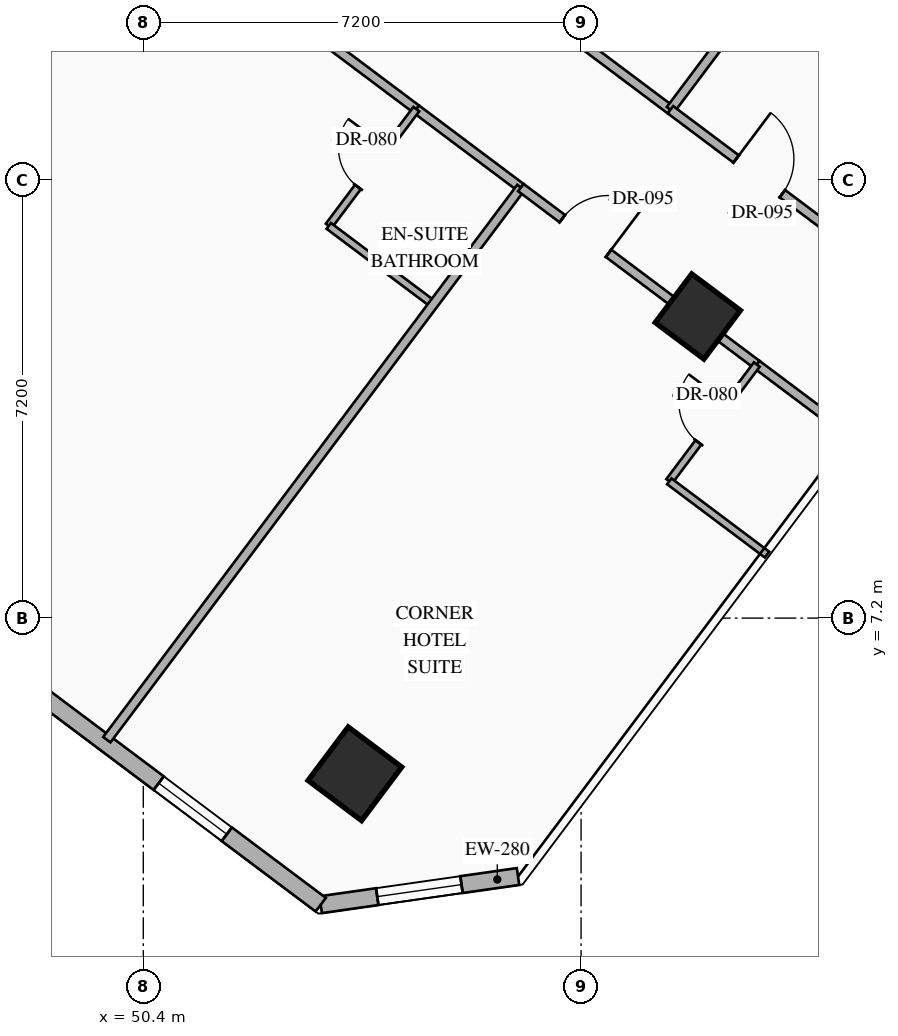
"""IFC4 building model, lengths in metres.
Left out: names, types, materials, properties, quantities, classifications, styles, units other than length and angle.
Written with IfcOpenShell. Run it as: python <this file> out.ifc"""

import sys

from ifc_helpers import new_model, si_unit, direction, frame, frame_2d, origin, origin_2d, place, context, subcontext, project, spatial, rectangle, hollow_rectangle, extrude, element, fill, save


model = new_model("IFC4")
c1 = context("Model", 3, precision=1e-05, world=origin(), true_north=direction((0.0, 1.0)))
c2 = subcontext(c1, "Body", "Model", "MODEL_VIEW")
j1 = project(units=[si_unit("LENGTHUNIT", "METRE"), si_unit("PLANEANGLEUNIT", "RADIAN")], contexts=[c1])
p1 = place(None, origin())
s1 = spatial("IfcSite", under=j1, at=p1, CompositionType="ELEMENT")
p2 = place(p1, origin())
s2 = spatial("IfcBuilding", under=s1, at=p2, CompositionType="ELEMENT")
p3 = place(p2, frame((0.0, 0.0, 46.65)))
s3 = spatial("IfcBuildingStorey", under=s2, at=p3, CompositionType="ELEMENT", Elevation=46.65)
p4 = place(p3, frame((53.88, 4.64, 0.0), z_axis=(0.0, 0.0, 1.0), x_axis=(0.799999996291, -0.600000004945, 0.0)))
e1 = element("IfcColumn", 1, at=p4, inside=s3, PredefinedType="COLUMN", context=c2, shape_type="SweptSolid", body=[
    extrude(hollow_rectangle(XDim=1.1, YDim=1.1, WallThickness=0.04, at=origin_2d()), origin(), (0.0, 0.0, 1.0), 3.35),
])
p5 = place(p3, frame((59.52, 12.16, 0.0), z_axis=(0.0, 0.0, 1.0), x_axis=(0.799999996291, -0.600000004945, 0.0)))
e2 = element("IfcColumn", 2, at=p5, inside=s3, PredefinedType="COLUMN", context=c2, shape_type="SweptSolid", body=[
    extrude(hollow_rectangle(XDim=1.0, YDim=1.0, WallThickness=0.038, at=origin_2d()), origin(), (0.0, 0.0, 1.0), 3.35),
])
p6 = place(p3, frame((56.563, 2.95, 0.0), z_axis=(0.0, 0.0, 1.0), x_axis=(-0.989977778067, -0.141223223777, 0.0)))
e3 = element("IfcWall", 3, at=p6, inside=s3, PredefinedType="STANDARD", context=c2, shape_type="SweptSolid", body=[
    extrude(rectangle(XDim=3.278, YDim=0.28, at=frame_2d((1.639, 0.0))), origin(), (0.0, 0.0, 1.0), 3.13),
])
p7 = place(p6, frame((0.939, 0.0, 0.85)))
e4 = element("IfcOpeningElement", 4, at=p7, cuts=e3, PredefinedType="OPENING", context=c2, shape_type="SweptSolid", body=[
    extrude(rectangle(XDim=1.4, YDim=1.8, at=frame_2d((0.7, 0.9))), frame((0.0, 0.15, 0.0), z_axis=(0.0, -1.0, 0.0), x_axis=(1.0, 0.0, 0.0)), (0.0, 0.0, 1.0), 0.3),
])
p8 = place(p3, frame((53.318, 2.487, 0.0), z_axis=(0.0, 0.0, 1.0), x_axis=(-0.800004174678, 0.599994433723, 0.0)))
e5 = element("IfcWall", 5, at=p8, inside=s3, PredefinedType="STANDARD", context=c2, shape_type="SweptSolid", body=[
    extrude(rectangle(XDim=35.089, YDim=0.28, at=frame_2d((17.544, 0.0))), origin(), (0.0, 0.0, 1.0), 3.13),
])
p9 = place(p8, frame((1.931, 0.0, 0.85)))
e6 = element("IfcOpeningElement", 6, at=p9, cuts=e5, PredefinedType="OPENING", context=c2, shape_type="SweptSolid", body=[
    extrude(rectangle(XDim=1.4, YDim=1.8, at=frame_2d((0.7, 0.9))), frame((0.0, 0.15, 0.0), z_axis=(0.0, -1.0, 0.0), x_axis=(1.0, 0.0, 0.0)), (0.0, 0.0, 1.0), 0.3),
])
p10 = place(p8, frame((6.819, 0.0, 0.85)))
e7 = element("IfcOpeningElement", 7, at=p10, cuts=e5, PredefinedType="OPENING", context=c2, shape_type="SweptSolid", body=[
    extrude(rectangle(XDim=1.4, YDim=1.8, at=frame_2d((0.7, 0.9))), frame((0.0, 0.15, 0.0), z_axis=(0.0, -1.0, 0.0), x_axis=(1.0, 0.0, 0.0)), (0.0, 0.0, 1.0), 0.3),
])
p11 = place(p8, frame((11.832, 0.0, 0.85)))
e8 = element("IfcOpeningElement", 8, at=p11, cuts=e5, PredefinedType="OPENING", context=c2, shape_type="SweptSolid", body=[
    extrude(rectangle(XDim=1.4, YDim=1.8, at=frame_2d((0.7, 0.9))), frame((0.0, 0.15, 0.0), z_axis=(0.0, -1.0, 0.0), x_axis=(1.0, 0.0, 0.0)), (0.0, 0.0, 1.0), 0.3),
])
p12 = place(p8, frame((17.647, 0.0, 0.85)))
e9 = element("IfcOpeningElement", 9, at=p12, cuts=e5, PredefinedType="OPENING", context=c2, shape_type="SweptSolid", body=[
    extrude(rectangle(XDim=1.4, YDim=1.8, at=frame_2d((0.7, 0.9))), frame((0.0, 0.15, 0.0), z_axis=(0.0, -1.0, 0.0), x_axis=(1.0, 0.0, 0.0)), (0.0, 0.0, 1.0), 0.3),
])
p13 = place(p8, frame((21.857, 0.0, 0.85)))
e10 = element("IfcOpeningElement", 10, at=p13, cuts=e5, PredefinedType="OPENING", context=c2, shape_type="SweptSolid", body=[
    extrude(rectangle(XDim=1.4, YDim=1.8, at=frame_2d((0.7, 0.9))), frame((0.0, 0.15, 0.0), z_axis=(0.0, -1.0, 0.0), x_axis=(1.0, 0.0, 0.0)), (0.0, 0.0, 1.0), 0.3),
])
p14 = place(p8, frame((26.87, 0.0, 0.85)))
e11 = element("IfcOpeningElement", 11, at=p14, cuts=e5, PredefinedType="OPENING", context=c2, shape_type="SweptSolid", body=[
    extrude(rectangle(XDim=1.4, YDim=1.8, at=frame_2d((0.7, 0.9))), frame((0.0, 0.15, 0.0), z_axis=(0.0, -1.0, 0.0), x_axis=(1.0, 0.0, 0.0)), (0.0, 0.0, 1.0), 0.3),
])
p15 = place(p8, frame((31.757, 0.0, 0.85)))
e12 = element("IfcOpeningElement", 12, at=p15, cuts=e5, PredefinedType="OPENING", context=c2, shape_type="SweptSolid", body=[
    extrude(rectangle(XDim=1.4, YDim=1.8, at=frame_2d((0.7, 0.9))), frame((0.0, 0.15, 0.0), z_axis=(0.0, -1.0, 0.0), x_axis=(1.0, 0.0, 0.0)), (0.0, 0.0, 1.0), 0.3),
])
p16 = place(p3, frame((57.35, 16.85, 0.0), z_axis=(0.0, 0.0, 1.0), x_axis=(0.79998637334, -0.60001816845, 0.0)))
e13 = element("IfcWall", 13, at=p16, inside=s3, PredefinedType="PARTITIONING", context=c2, shape_type="SweptSolid", body=[
    extrude(rectangle(XDim=2.15, YDim=0.15, at=frame_2d((1.075, 0.0))), origin(), (0.0, 0.0, 1.0), 2.775),
])
p17 = place(p3, frame((59.07, 15.56, 0.0), z_axis=(0.0, 0.0, 1.0), x_axis=(0.599996617946, 0.80000253653, 0.0)))
e14 = element("IfcWall", 14, at=p17, inside=s3, PredefinedType="PARTITIONING", context=c2, shape_type="SweptSolid", body=[
    extrude(rectangle(XDim=11.55, YDim=0.15, at=frame_2d((5.775, 0.0))), origin(), (0.0, 0.0, 1.0), 3.13),
])
p18 = place(p3, frame((59.07, 15.56, 0.0), z_axis=(0.0, 0.0, 1.0), x_axis=(0.8, -0.6, 0.0)))
e15 = element("IfcWall", 15, at=p18, inside=s3, PredefinedType="PARTITIONING", context=c2, shape_type="SweptSolid", body=[
    extrude(rectangle(XDim=3.65, YDim=0.15, at=frame_2d((1.825, 0.0))), origin(), (0.0, 0.0, 1.0), 2.775),
])
p19 = place(p18, frame((1.35, 0.0, 0.0)))
e16 = element("IfcOpeningElement", 16, at=p19, cuts=e15, PredefinedType="OPENING", context=c2, shape_type="SweptSolid", body=[
    extrude(rectangle(XDim=0.95, YDim=2.15, at=frame_2d((0.475, 1.075))), frame((0.0, 0.085, 0.0), z_axis=(0.0, -1.0, 0.0), x_axis=(1.0, 0.0, 0.0)), (0.0, 0.0, 1.0), 0.17),
])
p20 = place(p3, frame((46.37, 21.96, 0.0), z_axis=(0.0, 0.0, 1.0), x_axis=(0.799997249048, -0.600003667918, 0.0)))
e17 = element("IfcWall", 17, at=p20, inside=s3, PredefinedType="PARTITIONING", context=c2, shape_type="SweptSolid", body=[
    extrude(rectangle(XDim=10.65, YDim=0.15, at=frame_2d((5.325, 0.0))), origin(), (0.0, 0.0, 1.0), 2.425),
])
p21 = place(p20, frame((3.062, 0.0, 0.0)))
e18 = element("IfcOpeningElement", 18, at=p21, cuts=e17, PredefinedType="OPENING", context=c2, shape_type="SweptSolid", body=[
    extrude(rectangle(XDim=0.95, YDim=2.15, at=frame_2d((0.475, 1.075))), frame((0.0, 0.085, 0.0), z_axis=(0.0, -1.0, 0.0), x_axis=(1.0, 0.0, 0.0)), (0.0, 0.0, 1.0), 0.17),
])
p22 = place(p3, frame((54.89, 15.57, 0.0), z_axis=(0.0, 0.0, 1.0), x_axis=(0.800027249606, -0.599963665473, 0.0)))
e19 = element("IfcWall", 19, at=p22, inside=s3, PredefinedType="PARTITIONING", context=c2, shape_type="SweptSolid", body=[
    extrude(rectangle(XDim=2.15, YDim=0.15, at=frame_2d((1.075, 0.0))), origin(), (0.0, 0.0, 1.0), 2.425),
])
p23 = place(p3, frame((53.45, 13.65, 0.0), z_axis=(0.0, 0.0, 1.0), x_axis=(0.599951172744, 0.800036618114, 0.0)))
e20 = element("IfcWall", 20, at=p23, inside=s3, PredefinedType="PARTITIONING", context=c2, shape_type="SweptSolid", body=[
    extrude(rectangle(XDim=2.4, YDim=0.12, at=frame_2d((1.2, 0.0))), origin(), (0.0, 0.0, 1.0), 3.13),
])
p24 = place(p23, frame((0.8, 0.0, 0.0)))
e21 = element("IfcOpeningElement", 21, at=p24, cuts=e20, PredefinedType="OPENING", context=c2, shape_type="SweptSolid", body=[
    extrude(rectangle(XDim=0.8, YDim=2.06, at=frame_2d((0.4, 1.03))), frame((0.0, 0.07, 0.0), z_axis=(0.0, -1.0, 0.0), x_axis=(1.0, 0.0, 0.0)), (0.0, 0.0, 1.0), 0.14),
])
p25 = place(p3, frame((53.45, 13.65, 0.0), z_axis=(0.0, 0.0, 1.0), x_axis=(0.800040880289, -0.59994548908, 0.0)))
e22 = element("IfcWall", 22, at=p25, inside=s3, PredefinedType="PARTITIONING", context=c2, shape_type="SweptSolid", body=[
    extrude(rectangle(XDim=2.15, YDim=0.12, at=frame_2d((1.075, 0.0))), origin(), (0.0, 0.0, 1.0), 3.13),
])
p26 = place(p3, frame((49.8, 5.2, 0.0), z_axis=(0.0, 0.0, 1.0), x_axis=(0.6, 0.8, 0.0)))
e23 = element("IfcWall", 23, at=p26, inside=s3, PredefinedType="PARTITIONING", context=c2, shape_type="SweptSolid", body=[
    extrude(rectangle(XDim=11.35, YDim=0.15, at=frame_2d((5.675, 0.0))), origin(), (0.0, 0.0, 1.0), 3.13),
])
p27 = place(p3, frame((56.61, 14.28, 0.0), z_axis=(0.0, 0.0, 1.0), x_axis=(0.8, -0.6, 0.0)))
e24 = element("IfcWall", 24, at=p27, inside=s3, PredefinedType="PARTITIONING", context=c2, shape_type="SweptSolid", body=[
    extrude(rectangle(XDim=4.85, YDim=0.15, at=frame_2d((2.425, 0.0))), origin(), (0.0, 0.0, 1.0), 2.425),
])
p28 = place(p27, frame((0.851, 0.0, 0.0)))
e25 = element("IfcOpeningElement", 25, at=p28, cuts=e24, PredefinedType="OPENING", context=c2, shape_type="SweptSolid", body=[
    extrude(rectangle(XDim=0.95, YDim=2.15, at=frame_2d((0.475, 1.075))), frame((0.0, 0.085, 0.0), z_axis=(0.0, -1.0, 0.0), x_axis=(1.0, 0.0, 0.0)), (0.0, 0.0, 1.0), 0.17),
])
p29 = place(p3, frame((60.49, 11.37, 0.0), z_axis=(0.0, 0.0, 1.0), x_axis=(0.79997084737, -0.600038868206, 0.0)))
e26 = element("IfcWall", 26, at=p29, inside=s3, PredefinedType="PARTITIONING", context=c2, shape_type="SweptSolid", body=[
    extrude(rectangle(XDim=2.01, YDim=0.15, at=frame_2d((1.005, 0.0))), origin(), (0.0, 0.0, 1.0), 3.13),
])
p30 = place(p3, frame((59.05, 9.45, 0.0), z_axis=(0.0, 0.0, 1.0), x_axis=(0.599951172744, 0.800036618114, 0.0)))
e27 = element("IfcWall", 27, at=p30, inside=s3, PredefinedType="PARTITIONING", context=c2, shape_type="SweptSolid", body=[
    extrude(rectangle(XDim=2.4, YDim=0.12, at=frame_2d((1.2, 0.0))), origin(), (0.0, 0.0, 1.0), 3.13),
])
p31 = place(p30, frame((0.8, 0.0, 0.0)))
e28 = element("IfcOpeningElement", 28, at=p31, cuts=e27, PredefinedType="OPENING", context=c2, shape_type="SweptSolid", body=[
    extrude(rectangle(XDim=0.8, YDim=2.06, at=frame_2d((0.4, 1.03))), frame((0.0, 0.07, 0.0), z_axis=(0.0, -1.0, 0.0), x_axis=(1.0, 0.0, 0.0)), (0.0, 0.0, 1.0), 0.14),
])
p32 = place(p3, frame((59.05, 9.45, 0.0), z_axis=(0.0, 0.0, 1.0), x_axis=(0.79997084737, -0.600038868206, 0.0)))
e29 = element("IfcWall", 29, at=p32, inside=s3, PredefinedType="PARTITIONING", context=c2, shape_type="SweptSolid", body=[
    extrude(rectangle(XDim=2.01, YDim=0.12, at=frame_2d((1.005, 0.0))), origin(), (0.0, 0.0, 1.0), 3.13),
])
p33 = place(p7, origin())
e30 = element("IfcWindow", 30, at=p33, inside=s3, PartitioningType="SINGLE_PANEL", PredefinedType="WINDOW", context=c2, shape_type="SweptSolid", body=[
    extrude(rectangle(XDim=1.4, YDim=1.8, at=frame_2d((0.7, 0.9))), frame((0.0, 0.03, 0.0), z_axis=(0.0, -1.0, 0.0), x_axis=(1.0, 0.0, 0.0)), (0.0, 0.0, 1.0), 0.06),
])
fill(e4, e30)
p34 = place(p9, origin())
e31 = element("IfcWindow", 31, at=p34, inside=s3, PartitioningType="SINGLE_PANEL", PredefinedType="WINDOW", context=c2, shape_type="SweptSolid", body=[
    extrude(rectangle(XDim=1.4, YDim=1.8, at=frame_2d((0.7, 0.9))), frame((0.0, 0.03, 0.0), z_axis=(0.0, -1.0, 0.0), x_axis=(1.0, 0.0, 0.0)), (0.0, 0.0, 1.0), 0.06),
])
fill(e6, e31)
p35 = place(p19, origin())
e32 = element("IfcDoor", 32, at=p35, inside=s3, OperationType="SINGLE_SWING_LEFT", PredefinedType="DOOR", context=c2, shape_type="SweptSolid", body=[
    extrude(rectangle(XDim=0.95, YDim=2.15, at=frame_2d((0.475, 1.075))), frame((0.0, 0.025, 0.0), z_axis=(0.0, -1.0, 0.0), x_axis=(1.0, 0.0, 0.0)), (0.0, 0.0, 1.0), 0.05),
])
fill(e16, e32)
p36 = place(p24, origin())
e33 = element("IfcDoor", 33, at=p36, inside=s3, OperationType="SINGLE_SWING_RIGHT", PredefinedType="DOOR", context=c2, shape_type="SweptSolid", body=[
    extrude(rectangle(XDim=0.8, YDim=2.06, at=frame_2d((0.4, 1.03))), frame((0.0, 0.025, 0.0), z_axis=(0.0, -1.0, 0.0), x_axis=(1.0, 0.0, 0.0)), (0.0, 0.0, 1.0), 0.05),
])
fill(e21, e33)
p37 = place(p28, origin())
e34 = element("IfcDoor", 34, at=p37, inside=s3, OperationType="SINGLE_SWING_RIGHT", PredefinedType="DOOR", context=c2, shape_type="SweptSolid", body=[
    extrude(rectangle(XDim=0.95, YDim=2.15, at=frame_2d((0.475, 1.075))), frame((0.0, 0.025, 0.0), z_axis=(0.0, -1.0, 0.0), x_axis=(1.0, 0.0, 0.0)), (0.0, 0.0, 1.0), 0.05),
])
fill(e25, e34)
p38 = place(p31, origin())
e35 = element("IfcDoor", 35, at=p38, inside=s3, OperationType="SINGLE_SWING_RIGHT", PredefinedType="DOOR", context=c2, shape_type="SweptSolid", body=[
    extrude(rectangle(XDim=0.8, YDim=2.06, at=frame_2d((0.4, 1.03))), frame((0.0, 0.025, 0.0), z_axis=(0.0, -1.0, 0.0), x_axis=(1.0, 0.0, 0.0)), (0.0, 0.0, 1.0), 0.05),
])
fill(e28, e35)
save(model, sys.argv[1])
